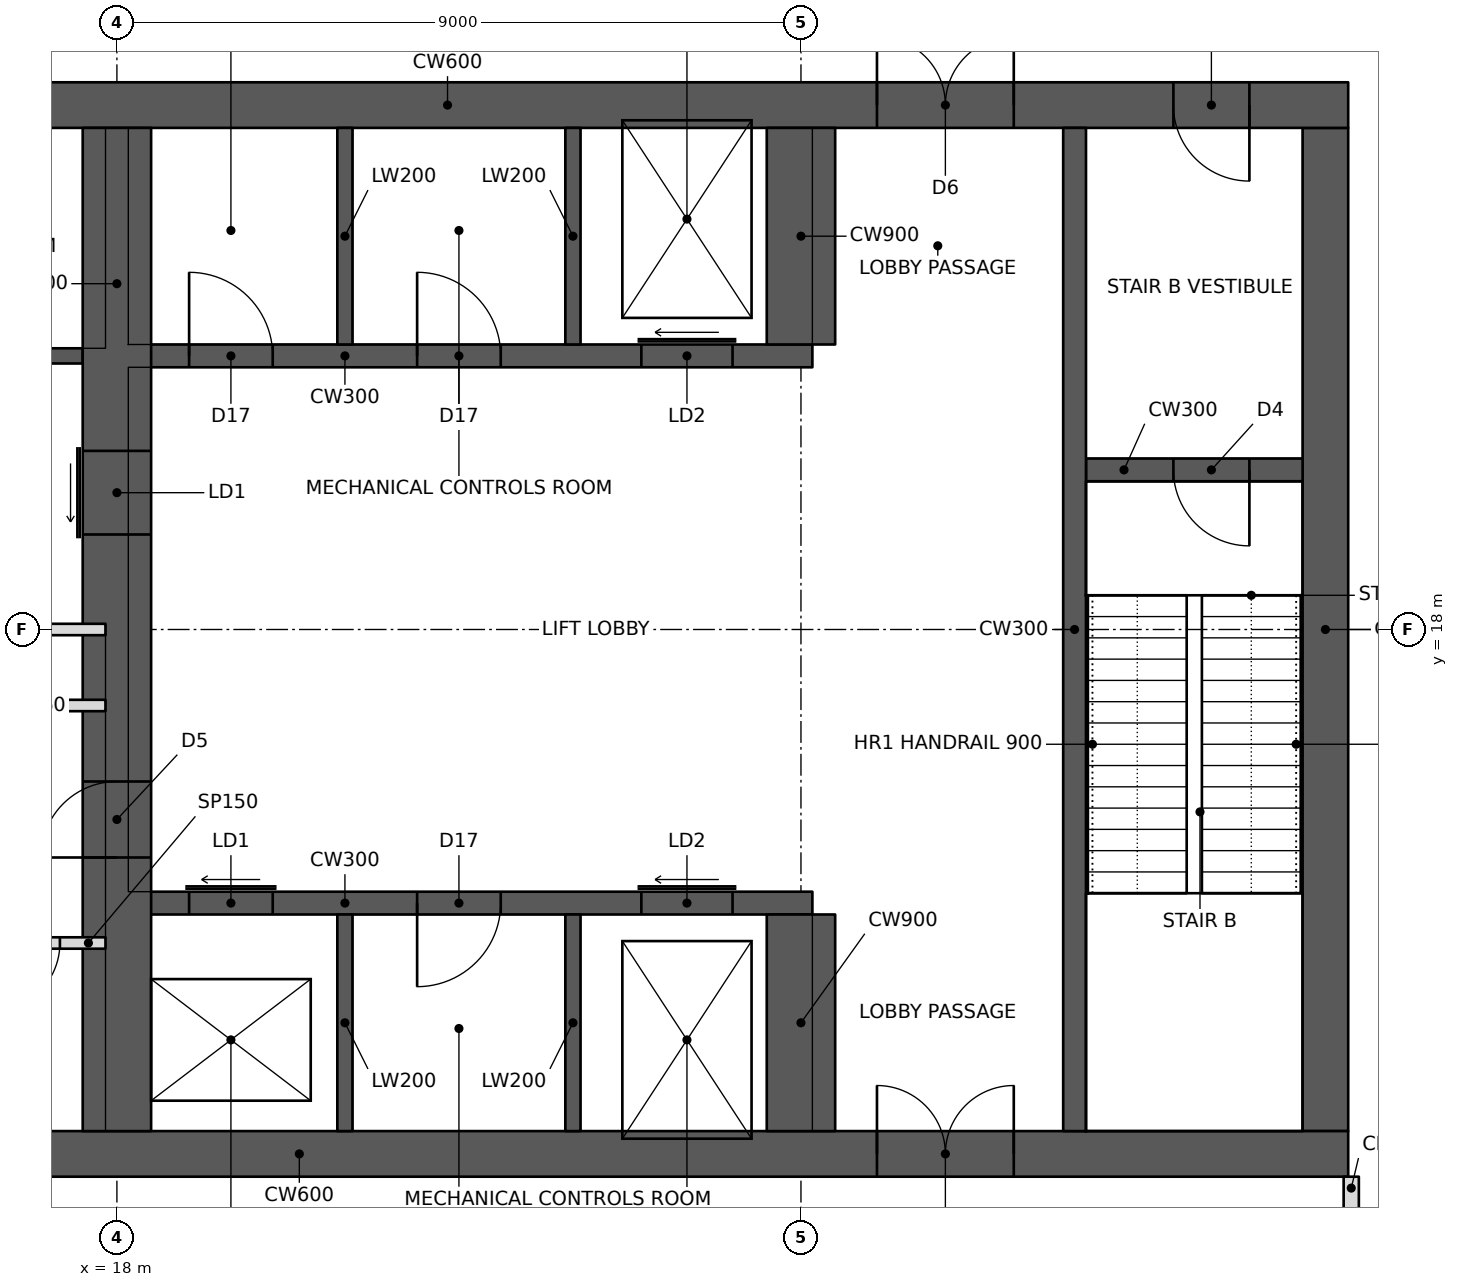
"""IFC4 building model, lengths in metres.
Left out: names, types, materials, properties, quantities, classifications, styles, units other than length and angle.
Written with IfcOpenShell. Run it as: python <this file> out.ifc"""

import sys

from ifc_helpers import new_model, si_unit, direction, frame, frame_2d, origin, place, context, subcontext, project, spatial, rectangle, extrude, element, fill, save


model = new_model("IFC4")
c1 = context("Model", 3, precision=1e-05, world=origin(), true_north=direction((0.0, 1.0)))
c2 = subcontext(c1, "Body", "Model", "MODEL_VIEW")
j1 = project(units=[si_unit("LENGTHUNIT", "METRE"), si_unit("PLANEANGLEUNIT", "RADIAN")], contexts=[c1])
p1 = place(None, origin())
s1 = spatial("IfcSite", under=j1, at=p1, CompositionType="ELEMENT")
p2 = place(p1, origin())
s2 = spatial("IfcBuilding", under=s1, at=p2, CompositionType="ELEMENT")
p3 = place(p2, frame((0.0, 0.0, 221.6)))
s3 = spatial("IfcBuildingStorey", under=s2, at=p3, CompositionType="ELEMENT", Elevation=221.6)
p4 = place(p3, frame((10.8, 11.1, 0.0), z_axis=(0.0, 0.0, 1.0), x_axis=(1.0, 0.0, 0.0)))
e1 = element("IfcWall", 1, at=p4, inside=s3, PredefinedType="SHEAR", context=c2, shape_type="SweptSolid", body=[
    extrude(rectangle(XDim=23.4, YDim=0.6, at=frame_2d((11.7, 0.0))), origin(), (0.0, 0.0, 1.0), 5.0),
])
p5 = place(p4, frame((1.0, 0.0, 0.0)))
e2 = element("IfcOpeningElement", 2, at=p5, cuts=e1, PredefinedType="OPENING", context=c2, shape_type="SweptSolid", body=[
    extrude(rectangle(XDim=1.0, YDim=2.1, at=frame_2d((0.5, 1.05))), frame((0.0, 0.31, 0.0), z_axis=(0.0, -1.0, 0.0), x_axis=(1.0, 0.0, 0.0)), (0.0, 0.0, 1.0), 0.62),
])
p6 = place(p4, frame((17.2, 0.0, 0.0)))
e3 = element("IfcOpeningElement", 3, at=p6, cuts=e1, PredefinedType="OPENING", context=c2, shape_type="SweptSolid", body=[
    extrude(rectangle(XDim=1.8, YDim=2.1, at=frame_2d((0.9, 1.05))), frame((0.0, 0.31, 0.0), z_axis=(0.0, -1.0, 0.0), x_axis=(1.0, 0.0, 0.0)), (0.0, 0.0, 1.0), 0.62),
])
p7 = place(p3, frame((10.8, 24.9, 0.0), z_axis=(0.0, 0.0, 1.0), x_axis=(1.0, 0.0, 0.0)))
e4 = element("IfcWall", 4, at=p7, inside=s3, PredefinedType="SHEAR", context=c2, shape_type="SweptSolid", body=[
    extrude(rectangle(XDim=23.4, YDim=0.6, at=frame_2d((11.7, 0.0))), origin(), (0.0, 0.0, 1.0), 5.0),
])
p8 = place(p7, frame((17.2, 0.0, 0.0)))
e5 = element("IfcOpeningElement", 5, at=p8, cuts=e4, PredefinedType="OPENING", context=c2, shape_type="SweptSolid", body=[
    extrude(rectangle(XDim=1.8, YDim=2.1, at=frame_2d((0.9, 1.05))), frame((0.0, 0.31, 0.0), z_axis=(0.0, -1.0, 0.0), x_axis=(1.0, 0.0, 0.0)), (0.0, 0.0, 1.0), 0.62),
])
p9 = place(p7, frame((21.1, 0.0, 0.0)))
e6 = element("IfcOpeningElement", 6, at=p9, cuts=e4, PredefinedType="OPENING", context=c2, shape_type="SweptSolid", body=[
    extrude(rectangle(XDim=1.0, YDim=2.1, at=frame_2d((0.5, 1.05))), frame((0.0, 0.31, 0.0), z_axis=(0.0, -1.0, 0.0), x_axis=(1.0, 0.0, 0.0)), (0.0, 0.0, 1.0), 0.62),
])
p10 = place(p7, frame((4.9, 0.0, 0.0)))
e7 = element("IfcOpeningElement", 7, at=p10, cuts=e4, PredefinedType="OPENING", context=c2, shape_type="SweptSolid", body=[
    extrude(rectangle(XDim=1.0, YDim=2.1, at=frame_2d((0.5, 1.05))), frame((0.0, 0.31, 0.0), z_axis=(0.0, -1.0, 0.0), x_axis=(1.0, 0.0, 0.0)), (0.0, 0.0, 1.0), 0.62),
])
p11 = place(p3, frame((33.9, 11.4, 0.0), z_axis=(0.0, 0.0, 1.0), x_axis=(0.0, 1.0, 0.0)))
e8 = element("IfcWall", 8, at=p11, inside=s3, PredefinedType="SHEAR", context=c2, shape_type="SweptSolid", body=[
    extrude(rectangle(XDim=13.2, YDim=0.6, at=frame_2d((6.6, 0.0))), origin(), (0.0, 0.0, 1.0), 5.0),
])
p12 = place(p3, frame((18.0, 11.4, 0.0), z_axis=(0.0, 0.0, 1.0), x_axis=(0.0, 1.0, 0.0)))
e9 = element("IfcWall", 9, at=p12, inside=s3, PredefinedType="SHEAR", context=c2, shape_type="SweptSolid", body=[
    extrude(rectangle(XDim=13.2, YDim=0.9, at=frame_2d((6.6, 0.0))), origin(), (0.0, 0.0, 1.0), 5.0),
])
p13 = place(p12, frame((3.6, 0.0, 0.0)))
e10 = element("IfcOpeningElement", 10, at=p13, cuts=e9, PredefinedType="OPENING", context=c2, shape_type="SweptSolid", body=[
    extrude(rectangle(XDim=1.0, YDim=2.1, at=frame_2d((0.5, 1.05))), frame((0.0, 0.46, 0.0), z_axis=(0.0, -1.0, 0.0), x_axis=(1.0, 0.0, 0.0)), (0.0, 0.0, 1.0), 0.92),
])
p14 = place(p12, frame((7.85, 0.0, 0.0)))
e11 = element("IfcOpeningElement", 11, at=p14, cuts=e9, PredefinedType="OPENING", context=c2, shape_type="SweptSolid", body=[
    extrude(rectangle(XDim=1.1, YDim=2.1, at=frame_2d((0.55, 1.05))), frame((0.0, 0.46, 0.0), z_axis=(0.0, -1.0, 0.0), x_axis=(1.0, 0.0, 0.0)), (0.0, 0.0, 1.0), 0.92),
])
p15 = place(p3, frame((14.55, 18.0, 0.0), z_axis=(0.0, 0.0, 1.0), x_axis=(1.0, 0.0, 0.0)))
e12 = element("IfcWall", 12, at=p15, inside=s3, PredefinedType="PARTITIONING", context=c2, shape_type="SweptSolid", body=[
    extrude(rectangle(XDim=3.3, YDim=0.15, at=frame_2d((1.65, 0.0))), origin(), (0.0, 0.0, 1.0), 4.8),
])
p16 = place(p3, frame((18.15, 14.4, 0.0), z_axis=(0.0, 0.0, 1.0), x_axis=(1.0, 0.0, 0.0)))
e13 = element("IfcWall", 13, at=p16, inside=s3, PredefinedType="SHEAR", context=c2, shape_type="SweptSolid", body=[
    extrude(rectangle(XDim=9.0, YDim=0.3, at=frame_2d((4.5, 0.0))), origin(), (0.0, 0.0, 1.0), 5.0),
])
p17 = place(p16, frame((0.8, 0.0, 0.0)))
e14 = element("IfcOpeningElement", 14, at=p17, cuts=e13, PredefinedType="OPENING", context=c2, shape_type="SweptSolid", body=[
    extrude(rectangle(XDim=1.1, YDim=2.1, at=frame_2d((0.55, 1.05))), frame((0.0, 0.16, 0.0), z_axis=(0.0, -1.0, 0.0), x_axis=(1.0, 0.0, 0.0)), (0.0, 0.0, 1.0), 0.32),
])
p18 = place(p16, frame((6.75, 0.0, 0.0)))
e15 = element("IfcOpeningElement", 15, at=p18, cuts=e13, PredefinedType="OPENING", context=c2, shape_type="SweptSolid", body=[
    extrude(rectangle(XDim=1.2, YDim=2.1, at=frame_2d((0.6, 1.05))), frame((0.0, 0.16, 0.0), z_axis=(0.0, -1.0, 0.0), x_axis=(1.0, 0.0, 0.0)), (0.0, 0.0, 1.0), 0.32),
])
p19 = place(p16, frame((3.8, 0.0, 0.0)))
e16 = element("IfcOpeningElement", 16, at=p19, cuts=e13, PredefinedType="OPENING", context=c2, shape_type="SweptSolid", body=[
    extrude(rectangle(XDim=1.1, YDim=2.1, at=frame_2d((0.55, 1.05))), frame((0.0, 0.16, 0.0), z_axis=(0.0, -1.0, 0.0), x_axis=(1.0, 0.0, 0.0)), (0.0, 0.0, 1.0), 0.32),
])
p20 = place(p3, frame((27.0, 11.4, 0.0), z_axis=(0.0, 0.0, 1.0), x_axis=(0.0, 1.0, 0.0)))
e17 = element("IfcWall", 17, at=p20, inside=s3, PredefinedType="SHEAR", context=c2, shape_type="SweptSolid", body=[
    extrude(rectangle(XDim=2.85, YDim=0.9, at=frame_2d((1.425, 0.0))), origin(), (0.0, 0.0, 1.0), 5.0),
])
for number, where, z_axis, x_axis in (
    (18, (21.0, 11.4, 0.0), (0.0, 0.0, 1.0), (0.0, 1.0, 0.0)),
    (19, (24.0, 11.4, 0.0), (0.0, 0.0, 1.0), (0.0, 1.0, 0.0)),
):
    element("IfcWall", number, at=place(p3, frame(where, z_axis=z_axis, x_axis=x_axis)), inside=s3, PredefinedType="SHEAR", context=c2, shape_type="SweptSolid", body=[
        extrude(rectangle(XDim=2.85, YDim=0.2, at=frame_2d((1.425, 0.0))), origin(), (0.0, 0.0, 1.0), 5.0),
    ])
p21 = place(p3, frame((18.15, 21.6, 0.0), z_axis=(0.0, 0.0, 1.0), x_axis=(1.0, 0.0, 0.0)))
e20 = element("IfcWall", 20, at=p21, inside=s3, PredefinedType="SHEAR", context=c2, shape_type="SweptSolid", body=[
    extrude(rectangle(XDim=9.0, YDim=0.3, at=frame_2d((4.5, 0.0))), origin(), (0.0, 0.0, 1.0), 5.0),
])
p22 = place(p21, frame((6.75, 0.0, 0.0)))
e21 = element("IfcOpeningElement", 21, at=p22, cuts=e20, PredefinedType="OPENING", context=c2, shape_type="SweptSolid", body=[
    extrude(rectangle(XDim=1.2, YDim=2.1, at=frame_2d((0.6, 1.05))), frame((0.0, 0.16, 0.0), z_axis=(0.0, -1.0, 0.0), x_axis=(1.0, 0.0, 0.0)), (0.0, 0.0, 1.0), 0.32),
])
p23 = place(p21, frame((0.8, 0.0, 0.0)))
e22 = element("IfcOpeningElement", 22, at=p23, cuts=e20, PredefinedType="OPENING", context=c2, shape_type="SweptSolid", body=[
    extrude(rectangle(XDim=1.1, YDim=2.1, at=frame_2d((0.55, 1.05))), frame((0.0, 0.16, 0.0), z_axis=(0.0, -1.0, 0.0), x_axis=(1.0, 0.0, 0.0)), (0.0, 0.0, 1.0), 0.32),
])
p24 = place(p21, frame((3.8, 0.0, 0.0)))
e23 = element("IfcOpeningElement", 23, at=p24, cuts=e20, PredefinedType="OPENING", context=c2, shape_type="SweptSolid", body=[
    extrude(rectangle(XDim=1.1, YDim=2.1, at=frame_2d((0.55, 1.05))), frame((0.0, 0.16, 0.0), z_axis=(0.0, -1.0, 0.0), x_axis=(1.0, 0.0, 0.0)), (0.0, 0.0, 1.0), 0.32),
])
p25 = place(p3, frame((27.0, 21.75, 0.0), z_axis=(0.0, 0.0, 1.0), x_axis=(0.0, 1.0, 0.0)))
e24 = element("IfcWall", 24, at=p25, inside=s3, PredefinedType="SHEAR", context=c2, shape_type="SweptSolid", body=[
    extrude(rectangle(XDim=2.85, YDim=0.9, at=frame_2d((1.425, 0.0))), origin(), (0.0, 0.0, 1.0), 5.0),
])
for number, where, z_axis, x_axis in (
    (25, (21.0, 21.75, 0.0), (0.0, 0.0, 1.0), (0.0, 1.0, 0.0)),
    (26, (24.0, 21.75, 0.0), (0.0, 0.0, 1.0), (0.0, 1.0, 0.0)),
):
    element("IfcWall", number, at=place(p3, frame(where, z_axis=z_axis, x_axis=x_axis)), inside=s3, PredefinedType="SHEAR", context=c2, shape_type="SweptSolid", body=[
        extrude(rectangle(XDim=2.85, YDim=0.2, at=frame_2d((1.425, 0.0))), origin(), (0.0, 0.0, 1.0), 5.0),
    ])
p26 = place(p3, frame((30.6, 11.4, 0.0), z_axis=(0.0, 0.0, 1.0), x_axis=(0.0, 1.0, 0.0)))
e27 = element("IfcWall", 27, at=p26, inside=s3, PredefinedType="SHEAR", context=c2, shape_type="SweptSolid", body=[
    extrude(rectangle(XDim=13.2, YDim=0.3, at=frame_2d((6.6, 0.0))), origin(), (0.0, 0.0, 1.0), 5.0),
])
p27 = place(p3, frame((30.75, 20.1, 0.0), z_axis=(0.0, 0.0, 1.0), x_axis=(1.0, 0.0, 0.0)))
e28 = element("IfcWall", 28, at=p27, inside=s3, PredefinedType="SHEAR", context=c2, shape_type="SweptSolid", body=[
    extrude(rectangle(XDim=2.85, YDim=0.3, at=frame_2d((1.425, 0.0))), origin(), (0.0, 0.0, 1.0), 5.0),
])
p28 = place(p27, frame((1.15, 0.0, 0.0)))
e29 = element("IfcOpeningElement", 29, at=p28, cuts=e28, PredefinedType="OPENING", context=c2, shape_type="SweptSolid", body=[
    extrude(rectangle(XDim=1.0, YDim=2.1, at=frame_2d((0.5, 1.05))), frame((0.0, 0.16, 0.0), z_axis=(0.0, -1.0, 0.0), x_axis=(1.0, 0.0, 0.0)), (0.0, 0.0, 1.0), 0.32),
])
p29 = place(p3, frame((14.55, 21.6, 0.0), z_axis=(0.0, 0.0, 1.0), x_axis=(1.0, 0.0, 0.0)))
e30 = element("IfcWall", 30, at=p29, inside=s3, PredefinedType="SHEAR", context=c2, shape_type="SweptSolid", body=[
    extrude(rectangle(XDim=3.0, YDim=0.2, at=frame_2d((1.5, 0.0))), origin(), (0.0, 0.0, 1.0), 5.0),
])
p30 = place(p3, frame((34.24, 9.1, 0.0), z_axis=(0.0, 0.0, 1.0), x_axis=(0.0, 1.0, 0.0)))
e31 = element("IfcWall", 31, at=p30, inside=s3, PredefinedType="PARTITIONING", context=c2, shape_type="SweptSolid", body=[
    extrude(rectangle(XDim=1.7, YDim=0.2, at=frame_2d((0.85, 0.0))), origin(), (0.0, 0.0, 1.0), 4.004),
])
p31 = place(p30, frame((0.25, 0.0, 0.0)))
e32 = element("IfcOpeningElement", 32, at=p31, cuts=e31, PredefinedType="OPENING", context=c2, shape_type="SweptSolid", body=[
    extrude(rectangle(XDim=1.0, YDim=2.1, at=frame_2d((0.5, 1.05))), frame((0.0, 0.11, 0.0), z_axis=(0.0, -1.0, 0.0), x_axis=(1.0, 0.0, 0.0)), (0.0, 0.0, 1.0), 0.22),
])
p32 = place(p3, frame((14.55, 17.0, 0.0), z_axis=(0.0, 0.0, 1.0), x_axis=(1.0, 0.0, 0.0)))
e33 = element("IfcWall", 33, at=p32, inside=s3, PredefinedType="PARTITIONING", context=c2, shape_type="SweptSolid", body=[
    extrude(rectangle(XDim=3.3, YDim=0.15, at=frame_2d((1.65, 0.0))), origin(), (0.0, 0.0, 1.0), 4.8),
])
p33 = place(p32, frame((0.3, 0.0, 0.0)))
e34 = element("IfcOpeningElement", 34, at=p33, cuts=e33, PredefinedType="OPENING", context=c2, shape_type="SweptSolid", body=[
    extrude(rectangle(XDim=1.0, YDim=2.1, at=frame_2d((0.5, 1.05))), frame((0.0, 0.085, 0.0), z_axis=(0.0, -1.0, 0.0), x_axis=(1.0, 0.0, 0.0)), (0.0, 0.0, 1.0), 0.17),
])
p34 = place(p3, frame((14.55, 13.875, 0.0), z_axis=(0.0, 0.0, 1.0), x_axis=(1.0, 0.0, 0.0)))
e35 = element("IfcWall", 35, at=p34, inside=s3, PredefinedType="PARTITIONING", context=c2, shape_type="SweptSolid", body=[
    extrude(rectangle(XDim=3.3, YDim=0.15, at=frame_2d((1.65, 0.0))), origin(), (0.0, 0.0, 1.0), 4.8),
])
p35 = place(p34, frame((0.2, 0.0, 0.0)))
e36 = element("IfcOpeningElement", 36, at=p35, cuts=e35, PredefinedType="OPENING", context=c2, shape_type="SweptSolid", body=[
    extrude(rectangle(XDim=0.9, YDim=2.1, at=frame_2d((0.45, 1.05))), frame((0.0, 0.085, 0.0), z_axis=(0.0, -1.0, 0.0), x_axis=(1.0, 0.0, 0.0)), (0.0, 0.0, 1.0), 0.17),
])
p36 = place(p34, frame((1.8, 0.0, 0.0)))
e37 = element("IfcOpeningElement", 37, at=p36, cuts=e35, PredefinedType="OPENING", context=c2, shape_type="SweptSolid", body=[
    extrude(rectangle(XDim=0.9, YDim=2.1, at=frame_2d((0.45, 1.05))), frame((0.0, 0.085, 0.0), z_axis=(0.0, -1.0, 0.0), x_axis=(1.0, 0.0, 0.0)), (0.0, 0.0, 1.0), 0.17),
])
p37 = place(p36, frame((0.9, 0.0, 0.0), z_axis=(0.0, 0.0, 1.0), x_axis=(-1.0, 0.0, 0.0)))
e38 = element("IfcDoor", 38, at=p37, inside=s3, OperationType="SINGLE_SWING_RIGHT", PredefinedType="DOOR", context=c2, shape_type="SweptSolid", body=[
    extrude(rectangle(XDim=0.9, YDim=2.1, at=frame_2d((0.45, 1.05))), frame((0.0, 0.025, 0.0), z_axis=(0.0, -1.0, 0.0), x_axis=(1.0, 0.0, 0.0)), (0.0, 0.0, 1.0), 0.05),
])
fill(e37, e38)
p38 = place(p6, origin())
e39 = element("IfcDoor", 39, at=p38, inside=s3, OperationType="DOUBLE_DOOR_SINGLE_SWING", PredefinedType="DOOR", context=c2, shape_type="SweptSolid", body=[
    extrude(rectangle(XDim=1.8, YDim=2.1, at=frame_2d((0.9, 1.05))), frame((0.0, 0.025, 0.0), z_axis=(0.0, -1.0, 0.0), x_axis=(1.0, 0.0, 0.0)), (0.0, 0.0, 1.0), 0.05),
])
fill(e3, e39)
p39 = place(p8, origin())
e40 = element("IfcDoor", 40, at=p39, inside=s3, OperationType="DOUBLE_DOOR_SINGLE_SWING", PredefinedType="DOOR", context=c2, shape_type="SweptSolid", body=[
    extrude(rectangle(XDim=1.8, YDim=2.1, at=frame_2d((0.9, 1.05))), frame((0.0, 0.025, 0.0), z_axis=(0.0, -1.0, 0.0), x_axis=(1.0, 0.0, 0.0)), (0.0, 0.0, 1.0), 0.05),
])
fill(e5, e40)
p40 = place(p9, frame((1.0, 0.0, 0.0), z_axis=(0.0, 0.0, 1.0), x_axis=(-1.0, 0.0, 0.0)))
e41 = element("IfcDoor", 41, at=p40, inside=s3, OperationType="SINGLE_SWING_LEFT", PredefinedType="DOOR", context=c2, shape_type="SweptSolid", body=[
    extrude(rectangle(XDim=1.0, YDim=2.1, at=frame_2d((0.5, 1.05))), frame((0.0, 0.025, 0.0), z_axis=(0.0, -1.0, 0.0), x_axis=(1.0, 0.0, 0.0)), (0.0, 0.0, 1.0), 0.05),
])
fill(e6, e41)
p41 = place(p28, frame((1.0, 0.0, 0.0), z_axis=(0.0, 0.0, 1.0), x_axis=(-1.0, 0.0, 0.0)))
e42 = element("IfcDoor", 42, at=p41, inside=s3, OperationType="SINGLE_SWING_LEFT", PredefinedType="DOOR", context=c2, shape_type="SweptSolid", body=[
    extrude(rectangle(XDim=1.0, YDim=2.1, at=frame_2d((0.5, 1.05))), frame((0.0, 0.025, 0.0), z_axis=(0.0, -1.0, 0.0), x_axis=(1.0, 0.0, 0.0)), (0.0, 0.0, 1.0), 0.05),
])
fill(e29, e42)
p42 = place(p13, origin())
e43 = element("IfcDoor", 43, at=p42, inside=s3, OperationType="SINGLE_SWING_LEFT", PredefinedType="DOOR", context=c2, shape_type="SweptSolid", body=[
    extrude(rectangle(XDim=1.0, YDim=2.1, at=frame_2d((0.5, 1.05))), frame((0.0, 0.025, 0.0), z_axis=(0.0, -1.0, 0.0), x_axis=(1.0, 0.0, 0.0)), (0.0, 0.0, 1.0), 0.05),
])
fill(e10, e43)
p43 = place(p17, origin())
e44 = element("IfcDoor", 44, at=p43, inside=s3, OperationType="SLIDING_TO_LEFT", PredefinedType="DOOR", context=c2, shape_type="SweptSolid", body=[
    extrude(rectangle(XDim=1.1, YDim=2.1, at=frame_2d((0.55, 1.05))), frame((0.0, 0.025, 0.0), z_axis=(0.0, -1.0, 0.0), x_axis=(1.0, 0.0, 0.0)), (0.0, 0.0, 1.0), 0.05),
])
fill(e14, e44)
p44 = place(p14, origin())
e45 = element("IfcDoor", 45, at=p44, inside=s3, OperationType="SLIDING_TO_LEFT", PredefinedType="DOOR", context=c2, shape_type="SweptSolid", body=[
    extrude(rectangle(XDim=1.1, YDim=2.1, at=frame_2d((0.55, 1.05))), frame((0.0, 0.025, 0.0), z_axis=(0.0, -1.0, 0.0), x_axis=(1.0, 0.0, 0.0)), (0.0, 0.0, 1.0), 0.05),
])
fill(e11, e45)
p45 = place(p18, origin())
e46 = element("IfcDoor", 46, at=p45, inside=s3, OperationType="SLIDING_TO_LEFT", PredefinedType="DOOR", context=c2, shape_type="SweptSolid", body=[
    extrude(rectangle(XDim=1.2, YDim=2.1, at=frame_2d((0.6, 1.05))), frame((0.0, 0.025, 0.0), z_axis=(0.0, -1.0, 0.0), x_axis=(1.0, 0.0, 0.0)), (0.0, 0.0, 1.0), 0.05),
])
fill(e15, e46)
p46 = place(p22, origin())
e47 = element("IfcDoor", 47, at=p46, inside=s3, OperationType="SLIDING_TO_LEFT", PredefinedType="DOOR", context=c2, shape_type="SweptSolid", body=[
    extrude(rectangle(XDim=1.2, YDim=2.1, at=frame_2d((0.6, 1.05))), frame((0.0, 0.025, 0.0), z_axis=(0.0, -1.0, 0.0), x_axis=(1.0, 0.0, 0.0)), (0.0, 0.0, 1.0), 0.05),
])
fill(e21, e47)
p47 = place(p23, origin())
e48 = element("IfcDoor", 48, at=p47, inside=s3, OperationType="SINGLE_SWING_LEFT", PredefinedType="DOOR", context=c2, shape_type="SweptSolid", body=[
    extrude(rectangle(XDim=1.1, YDim=2.1, at=frame_2d((0.55, 1.05))), frame((0.0, 0.025, 0.0), z_axis=(0.0, -1.0, 0.0), x_axis=(1.0, 0.0, 0.0)), (0.0, 0.0, 1.0), 0.05),
])
fill(e22, e48)
p48 = place(p24, origin())
e49 = element("IfcDoor", 49, at=p48, inside=s3, OperationType="SINGLE_SWING_LEFT", PredefinedType="DOOR", context=c2, shape_type="SweptSolid", body=[
    extrude(rectangle(XDim=1.1, YDim=2.1, at=frame_2d((0.55, 1.05))), frame((0.0, 0.025, 0.0), z_axis=(0.0, -1.0, 0.0), x_axis=(1.0, 0.0, 0.0)), (0.0, 0.0, 1.0), 0.05),
])
fill(e23, e49)
p49 = place(p19, frame((1.1, 0.0, 0.0), z_axis=(0.0, 0.0, 1.0), x_axis=(-1.0, 0.0, 0.0)))
e50 = element("IfcDoor", 50, at=p49, inside=s3, OperationType="SINGLE_SWING_RIGHT", PredefinedType="DOOR", context=c2, shape_type="SweptSolid", body=[
    extrude(rectangle(XDim=1.1, YDim=2.1, at=frame_2d((0.55, 1.05))), frame((0.0, 0.025, 0.0), z_axis=(0.0, -1.0, 0.0), x_axis=(1.0, 0.0, 0.0)), (0.0, 0.0, 1.0), 0.05),
])
fill(e16, e50)
save(model, sys.argv[1])
